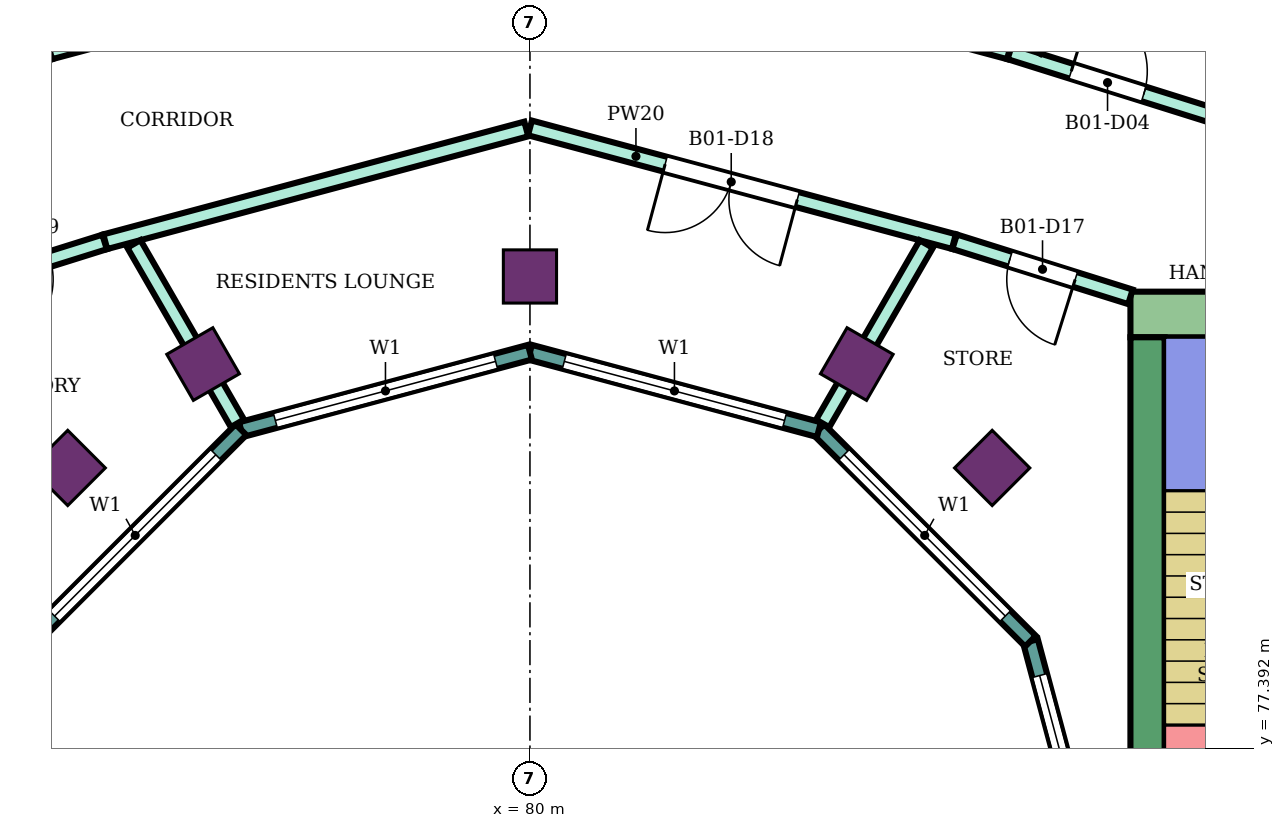
"""IFC4 building model, lengths in metres.
Left out: names, types, materials, properties, quantities, classifications, styles, units other than length and angle.
Written with IfcOpenShell. Run it as: python <this file> out.ifc"""

import sys

from ifc_helpers import new_model, si_unit, direction, frame, frame_2d, origin, origin_2d, place, context, subcontext, project, spatial, rectangle, extrude, element, fill, save


model = new_model("IFC4")
c1 = context("Model", 3, precision=1e-05, world=origin(), true_north=direction((0.0, 1.0)))
c2 = subcontext(c1, "Body", "Model", "MODEL_VIEW")
j1 = project(units=[si_unit("LENGTHUNIT", "METRE"), si_unit("PLANEANGLEUNIT", "RADIAN")], contexts=[c1])
p1 = place(None, origin())
s1 = spatial("IfcSite", under=j1, at=p1, CompositionType="ELEMENT")
p2 = place(p1, origin())
s2 = spatial("IfcBuilding", under=s1, at=p2, CompositionType="ELEMENT")
p3 = place(p2, frame((0.0, 0.0, 216.7)))
s3 = spatial("IfcBuildingStorey", under=s2, at=p3, CompositionType="ELEMENT", Elevation=216.7)
for number, where, z_axis, x_axis in (
    (1, (86.081, 81.081, 0.0), (0.0, 0.0, 1.0), (0.707, 0.707, 0.0)),
    (2, (84.3, 82.448, 0.0), (0.0, 0.0, 1.0), (0.5, 0.866, 0.0)),
    (3, (80.0, 83.6, 0.0), (0.0, 0.0, 1.0), (0.0, 1.0, 0.0)),
    (4, (75.7, 82.448, 0.0), (0.0, 0.0, 1.0), (-0.5, 0.866, 0.0)),
    (5, (73.919, 81.081, 0.0), (0.0, 0.0, 1.0), (-0.707, 0.707, 0.0)),
):
    element("IfcColumn", number, at=place(p3, frame(where, z_axis=z_axis, x_axis=x_axis)), inside=s3, PredefinedType="COLUMN", context=c2, shape_type="SweptSolid", body=[
        extrude(rectangle(XDim=0.7, YDim=0.7, at=origin_2d()), origin(), (0.0, 0.0, 1.0), 4.2),
    ])
p4 = place(p3, frame((87.9, 83.1, 0.0), z_axis=(0.0, 0.0, 1.0), x_axis=(1.0, 0.0, 0.0)))
e6 = element("IfcWall", 6, at=p4, inside=s3, PredefinedType="SHEAR", context=c2, shape_type="SweptSolid", body=[
    extrude(rectangle(XDim=14.9, YDim=0.6, at=frame_2d((7.45, 0.0))), origin(), (0.0, 0.0, 1.0), 3.88),
])
p5 = place(p4, frame((4.2, 0.0, 0.0)))
e7 = element("IfcOpeningElement", 7, at=p5, cuts=e6, PredefinedType="OPENING", context=c2, shape_type="SweptSolid", body=[
    extrude(rectangle(XDim=2.4, YDim=2.4, at=frame_2d((1.2, 1.2))), frame((0.0, 0.31, 0.0), z_axis=(0.0, -1.0, 0.0), x_axis=(1.0, 0.0, 0.0)), (0.0, 0.0, 1.0), 0.62),
])
p6 = place(p3, frame((88.125, 75.0, 0.0), z_axis=(0.0, 0.0, 1.0), x_axis=(0.0, 1.0, 0.0)))
e8 = element("IfcWall", 8, at=p6, inside=s3, PredefinedType="SHEAR", context=c2, shape_type="SweptSolid", body=[
    extrude(rectangle(XDim=7.8, YDim=0.45, at=frame_2d((3.9, 0.0))), origin(), (0.0, 0.0, 1.0), 3.88),
])
p7 = place(p3, frame((87.604, 75.0, 0.0), z_axis=(0.0, 0.0, 1.0), x_axis=(-0.258789828301, 0.965933654434, 0.0)))
e9 = element("IfcWall", 9, at=p7, inside=s3, PredefinedType="NOTDEFINED", context=c2, shape_type="SweptSolid", body=[
    extrude(rectangle(XDim=3.936, YDim=0.2, at=frame_2d((1.968, 0.0))), origin(), (0.0, 0.0, 1.0), 4.2),
])
p8 = place(p7, frame((0.468, 0.0, 0.9)))
e10 = element("IfcOpeningElement", 10, at=p8, cuts=e9, PredefinedType="OPENING", context=c2, shape_type="SweptSolid", body=[
    extrude(rectangle(XDim=3.0, YDim=2.3, at=frame_2d((1.5, 1.15))), frame((0.0, 0.11, 0.0), z_axis=(0.0, -1.0, 0.0), x_axis=(1.0, 0.0, 0.0)), (0.0, 0.0, 1.0), 0.22),
])
p9 = place(p3, frame((86.585, 78.802, 0.0), z_axis=(0.0, 0.0, 1.0), x_axis=(-0.707106781187, 0.707106781187, 0.0)))
e11 = element("IfcWall", 11, at=p9, inside=s3, PredefinedType="NOTDEFINED", context=c2, shape_type="SweptSolid", body=[
    extrude(rectangle(XDim=3.936, YDim=0.2, at=frame_2d((1.968, 0.0))), origin(), (0.0, 0.0, 1.0), 4.2),
])
p10 = place(p9, frame((0.468, 0.0, 0.9)))
e12 = element("IfcOpeningElement", 12, at=p10, cuts=e11, PredefinedType="OPENING", context=c2, shape_type="SweptSolid", body=[
    extrude(rectangle(XDim=3.0, YDim=2.3, at=frame_2d((1.5, 1.15))), frame((0.0, 0.11, 0.0), z_axis=(0.0, -1.0, 0.0), x_axis=(1.0, 0.0, 0.0)), (0.0, 0.0, 1.0), 0.22),
])
p11 = place(p3, frame((83.802, 81.585, 0.0), z_axis=(0.0, 0.0, 1.0), x_axis=(-0.965933654434, 0.258789828301, 0.0)))
e13 = element("IfcWall", 13, at=p11, inside=s3, PredefinedType="NOTDEFINED", context=c2, shape_type="SweptSolid", body=[
    extrude(rectangle(XDim=3.936, YDim=0.2, at=frame_2d((1.968, 0.0))), origin(), (0.0, 0.0, 1.0), 4.2),
])
p12 = place(p11, frame((0.468, 0.0, 0.9)))
e14 = element("IfcOpeningElement", 14, at=p12, cuts=e13, PredefinedType="OPENING", context=c2, shape_type="SweptSolid", body=[
    extrude(rectangle(XDim=3.0, YDim=2.3, at=frame_2d((1.5, 1.15))), frame((0.0, 0.11, 0.0), z_axis=(0.0, -1.0, 0.0), x_axis=(1.0, 0.0, 0.0)), (0.0, 0.0, 1.0), 0.22),
])
p13 = place(p3, frame((80.0, 82.604, 0.0), z_axis=(0.0, 0.0, 1.0), x_axis=(-0.965933654434, -0.258789828301, 0.0)))
e15 = element("IfcWall", 15, at=p13, inside=s3, PredefinedType="NOTDEFINED", context=c2, shape_type="SweptSolid", body=[
    extrude(rectangle(XDim=3.936, YDim=0.2, at=frame_2d((1.968, 0.0))), origin(), (0.0, 0.0, 1.0), 4.2),
])
p14 = place(p13, frame((0.468, 0.0, 0.9)))
e16 = element("IfcOpeningElement", 16, at=p14, cuts=e15, PredefinedType="OPENING", context=c2, shape_type="SweptSolid", body=[
    extrude(rectangle(XDim=3.0, YDim=2.3, at=frame_2d((1.5, 1.15))), frame((0.0, 0.11, 0.0), z_axis=(0.0, -1.0, 0.0), x_axis=(1.0, 0.0, 0.0)), (0.0, 0.0, 1.0), 0.22),
])
p15 = place(p3, frame((76.198, 81.585, 0.0), z_axis=(0.0, 0.0, 1.0), x_axis=(-0.707106781187, -0.707106781187, 0.0)))
e17 = element("IfcWall", 17, at=p15, inside=s3, PredefinedType="NOTDEFINED", context=c2, shape_type="SweptSolid", body=[
    extrude(rectangle(XDim=3.936, YDim=0.2, at=frame_2d((1.968, 0.0))), origin(), (0.0, 0.0, 1.0), 4.2),
])
p16 = place(p15, frame((0.468, 0.0, 0.9)))
e18 = element("IfcOpeningElement", 18, at=p16, cuts=e17, PredefinedType="OPENING", context=c2, shape_type="SweptSolid", body=[
    extrude(rectangle(XDim=3.0, YDim=2.3, at=frame_2d((1.5, 1.15))), frame((0.0, 0.11, 0.0), z_axis=(0.0, -1.0, 0.0), x_axis=(1.0, 0.0, 0.0)), (0.0, 0.0, 1.0), 0.22),
])
p17 = place(p3, frame((72.1, 83.332, 0.0), z_axis=(0.0, 0.0, 1.0), x_axis=(0.954233106619, 0.299063836383, 0.0)))
e19 = element("IfcWall", 19, at=p17, inside=s3, PredefinedType="PARTITIONING", context=c2, shape_type="SweptSolid", body=[
    extrude(rectangle(XDim=2.414, YDim=0.2, at=frame_2d((1.207, 0.0))), origin(), (0.0, 0.0, 1.0), 3.75),
])
p18 = place(p17, frame((0.762, 0.0, 0.0)))
e20 = element("IfcOpeningElement", 20, at=p18, cuts=e19, PredefinedType="OPENING", context=c2, shape_type="SweptSolid", body=[
    extrude(rectangle(XDim=0.9, YDim=2.1, at=frame_2d((0.45, 1.05))), frame((0.0, 0.11, 0.0), z_axis=(0.0, -1.0, 0.0), x_axis=(1.0, 0.0, 0.0)), (0.0, 0.0, 1.0), 0.22),
])
p19 = place(p3, frame((73.687, 86.555, 0.0), z_axis=(0.0, 0.0, 1.0), x_axis=(0.966020868517, 0.258464081818, 0.0)))
e21 = element("IfcWall", 21, at=p19, inside=s3, PredefinedType="PARTITIONING", context=c2, shape_type="SweptSolid", body=[
    extrude(rectangle(XDim=6.446, YDim=0.2, at=frame_2d((3.223, 0.0))), origin(), (0.0, 0.0, 1.0), 3.75),
])
p20 = place(p19, frame((5.362, 0.0, 0.0)))
e22 = element("IfcOpeningElement", 22, at=p20, cuts=e21, PredefinedType="OPENING", context=c2, shape_type="SweptSolid", body=[
    extrude(rectangle(XDim=1.0, YDim=2.1, at=frame_2d((0.5, 1.05))), frame((0.0, 0.11, 0.0), z_axis=(0.0, -1.0, 0.0), x_axis=(1.0, 0.0, 0.0)), (0.0, 0.0, 1.0), 0.22),
])
p21 = place(p3, frame((74.413, 84.057, 0.0), z_axis=(0.0, 0.0, 1.0), x_axis=(0.965970849692, 0.258650956976, 0.0)))
e23 = element("IfcWall", 23, at=p21, inside=s3, PredefinedType="PARTITIONING", context=c2, shape_type="SweptSolid", body=[
    extrude(rectangle(XDim=5.734, YDim=0.2, at=frame_2d((2.867, 0.0))), origin(), (0.0, 0.0, 1.0), 3.75),
])
p22 = place(p3, frame((74.79, 84.028, 0.0), z_axis=(0.0, 0.0, 1.0), x_axis=(0.499820708267, -0.866128893172, 0.0)))
e24 = element("IfcWall", 24, at=p22, inside=s3, PredefinedType="PARTITIONING", context=c2, shape_type="SweptSolid", body=[
    extrude(rectangle(XDim=2.725, YDim=0.2, at=frame_2d((1.362, 0.0))), origin(), (0.0, 0.0, 1.0), 3.75),
])
p23 = place(p3, frame((80.0, 85.554, 0.0), z_axis=(0.0, 0.0, 1.0), x_axis=(0.965894438951, -0.258936155845, 0.0)))
e25 = element("IfcWall", 25, at=p23, inside=s3, PredefinedType="PARTITIONING", context=c2, shape_type="SweptSolid", body=[
    extrude(rectangle(XDim=5.774, YDim=0.2, at=frame_2d((2.887, 0.0))), origin(), (0.0, 0.0, 1.0), 3.75),
])
p24 = place(p23, frame((1.841, 0.0, 0.0)))
e26 = element("IfcOpeningElement", 26, at=p24, cuts=e25, PredefinedType="OPENING", context=c2, shape_type="SweptSolid", body=[
    extrude(rectangle(XDim=1.8, YDim=2.1, at=frame_2d((0.9, 1.05))), frame((0.0, 0.11, 0.0), z_axis=(0.0, -1.0, 0.0), x_axis=(1.0, 0.0, 0.0)), (0.0, 0.0, 1.0), 0.22),
])
p25 = place(p3, frame((80.0, 88.246, 0.0), z_axis=(0.0, 0.0, 1.0), x_axis=(0.965866355913, -0.25904088966, 0.0)))
e27 = element("IfcWall", 27, at=p25, inside=s3, PredefinedType="PARTITIONING", context=c2, shape_type="SweptSolid", body=[
    extrude(rectangle(XDim=6.526, YDim=0.2, at=frame_2d((3.263, 0.0))), origin(), (0.0, 0.0, 1.0), 3.75),
])
p26 = place(p3, frame((83.852, 81.667, 0.0), z_axis=(0.0, 0.0, 1.0), x_axis=(0.500138740334, 0.865945287196, 0.0)))
e28 = element("IfcWall", 28, at=p26, inside=s3, PredefinedType="PARTITIONING", context=c2, shape_type="SweptSolid", body=[
    extrude(rectangle(XDim=2.724, YDim=0.2, at=frame_2d((1.362, 0.0))), origin(), (0.0, 0.0, 1.0), 3.75),
])
p27 = place(p3, frame((85.587, 84.057, 0.0), z_axis=(0.0, 0.0, 1.0), x_axis=(0.954239513179, -0.299043393987, 0.0)))
e29 = element("IfcWall", 29, at=p27, inside=s3, PredefinedType="PARTITIONING", context=c2, shape_type="SweptSolid", body=[
    extrude(rectangle(XDim=2.424, YDim=0.2, at=frame_2d((1.212, 0.0))), origin(), (0.0, 0.0, 1.0), 3.75),
])
p28 = place(p27, frame((0.762, 0.0, 0.0)))
e30 = element("IfcOpeningElement", 30, at=p28, cuts=e29, PredefinedType="OPENING", context=c2, shape_type="SweptSolid", body=[
    extrude(rectangle(XDim=0.9, YDim=2.1, at=frame_2d((0.45, 1.05))), frame((0.0, 0.11, 0.0), z_axis=(0.0, -1.0, 0.0), x_axis=(1.0, 0.0, 0.0)), (0.0, 0.0, 1.0), 0.22),
])
p29 = place(p3, frame((86.313, 86.554, 0.0), z_axis=(0.0, 0.0, 1.0), x_axis=(0.954081217458, -0.299548043717, 0.0)))
e31 = element("IfcWall", 31, at=p29, inside=s3, PredefinedType="PARTITIONING", context=c2, shape_type="SweptSolid", body=[
    extrude(rectangle(XDim=5.721, YDim=0.2, at=frame_2d((2.86, 0.0))), origin(), (0.0, 0.0, 1.0), 3.75),
])
p30 = place(p29, frame((0.848, 0.0, 0.0)))
e32 = element("IfcOpeningElement", 32, at=p30, cuts=e31, PredefinedType="OPENING", context=c2, shape_type="SweptSolid", body=[
    extrude(rectangle(XDim=1.0, YDim=2.1, at=frame_2d((0.5, 1.05))), frame((0.0, 0.11, 0.0), z_axis=(0.0, -1.0, 0.0), x_axis=(1.0, 0.0, 0.0)), (0.0, 0.0, 1.0), 0.22),
])
p31 = place(p3, frame((86.671, 86.554, 0.0), z_axis=(0.0, 0.0, 1.0), x_axis=(0.50001992892, 0.866013897511, 0.0)))
e33 = element("IfcWall", 33, at=p31, inside=s3, PredefinedType="PARTITIONING", context=c2, shape_type="SweptSolid", body=[
    extrude(rectangle(XDim=12.456, YDim=0.1, at=frame_2d((6.228, 0.0))), origin(), (0.0, 0.0, 1.0), 3.75),
])
p32 = place(p31, frame((9.215, 0.0, 0.0)))
e34 = element("IfcOpeningElement", 34, at=p32, cuts=e33, PredefinedType="OPENING", context=c2, shape_type="SweptSolid", body=[
    extrude(rectangle(XDim=0.9, YDim=2.1, at=frame_2d((0.45, 1.05))), frame((0.0, 0.06, 0.0), z_axis=(0.0, -1.0, 0.0), x_axis=(1.0, 0.0, 0.0)), (0.0, 0.0, 1.0), 0.12),
])
p33 = place(p31, frame((2.974, 0.0, 0.0)))
e35 = element("IfcOpeningElement", 35, at=p33, cuts=e33, PredefinedType="OPENING", context=c2, shape_type="SweptSolid", body=[
    extrude(rectangle(XDim=0.8, YDim=2.1, at=frame_2d((0.4, 1.05))), frame((0.0, 0.06, 0.0), z_axis=(0.0, -1.0, 0.0), x_axis=(1.0, 0.0, 0.0)), (0.0, 0.0, 1.0), 0.12),
])
p34 = place(p8, origin())
e36 = element("IfcWindow", 36, at=p34, inside=s3, PartitioningType="SINGLE_PANEL", PredefinedType="WINDOW", context=c2, shape_type="SweptSolid", body=[
    extrude(rectangle(XDim=3.0, YDim=2.3, at=frame_2d((1.5, 1.15))), frame((0.0, 0.03, 0.0), z_axis=(0.0, -1.0, 0.0), x_axis=(1.0, 0.0, 0.0)), (0.0, 0.0, 1.0), 0.06),
])
fill(e10, e36)
p35 = place(p10, origin())
e37 = element("IfcWindow", 37, at=p35, inside=s3, PartitioningType="SINGLE_PANEL", PredefinedType="WINDOW", context=c2, shape_type="SweptSolid", body=[
    extrude(rectangle(XDim=3.0, YDim=2.3, at=frame_2d((1.5, 1.15))), frame((0.0, 0.03, 0.0), z_axis=(0.0, -1.0, 0.0), x_axis=(1.0, 0.0, 0.0)), (0.0, 0.0, 1.0), 0.06),
])
fill(e12, e37)
p36 = place(p12, origin())
e38 = element("IfcWindow", 38, at=p36, inside=s3, PartitioningType="SINGLE_PANEL", PredefinedType="WINDOW", context=c2, shape_type="SweptSolid", body=[
    extrude(rectangle(XDim=3.0, YDim=2.3, at=frame_2d((1.5, 1.15))), frame((0.0, 0.03, 0.0), z_axis=(0.0, -1.0, 0.0), x_axis=(1.0, 0.0, 0.0)), (0.0, 0.0, 1.0), 0.06),
])
fill(e14, e38)
p37 = place(p14, origin())
e39 = element("IfcWindow", 39, at=p37, inside=s3, PartitioningType="SINGLE_PANEL", PredefinedType="WINDOW", context=c2, shape_type="SweptSolid", body=[
    extrude(rectangle(XDim=3.0, YDim=2.3, at=frame_2d((1.5, 1.15))), frame((0.0, 0.03, 0.0), z_axis=(0.0, -1.0, 0.0), x_axis=(1.0, 0.0, 0.0)), (0.0, 0.0, 1.0), 0.06),
])
fill(e16, e39)
p38 = place(p16, origin())
e40 = element("IfcWindow", 40, at=p38, inside=s3, PartitioningType="SINGLE_PANEL", PredefinedType="WINDOW", context=c2, shape_type="SweptSolid", body=[
    extrude(rectangle(XDim=3.0, YDim=2.3, at=frame_2d((1.5, 1.15))), frame((0.0, 0.03, 0.0), z_axis=(0.0, -1.0, 0.0), x_axis=(1.0, 0.0, 0.0)), (0.0, 0.0, 1.0), 0.06),
])
fill(e18, e40)
p39 = place(p30, origin())
e41 = element("IfcDoor", 41, at=p39, inside=s3, OperationType="SINGLE_SWING_LEFT", PredefinedType="DOOR", context=c2, shape_type="SweptSolid", body=[
    extrude(rectangle(XDim=1.0, YDim=2.1, at=frame_2d((0.5, 1.05))), frame((0.0, 0.025, 0.0), z_axis=(0.0, -1.0, 0.0), x_axis=(1.0, 0.0, 0.0)), (0.0, 0.0, 1.0), 0.05),
])
fill(e32, e41)
p40 = place(p28, frame((0.9, 0.0, 0.0), z_axis=(0.0, 0.0, 1.0), x_axis=(-1.0, 0.0, 0.0)))
e42 = element("IfcDoor", 42, at=p40, inside=s3, OperationType="SINGLE_SWING_LEFT", PredefinedType="DOOR", context=c2, shape_type="SweptSolid", body=[
    extrude(rectangle(XDim=0.9, YDim=2.1, at=frame_2d((0.45, 1.05))), frame((0.0, 0.025, 0.0), z_axis=(0.0, -1.0, 0.0), x_axis=(1.0, 0.0, 0.0)), (0.0, 0.0, 1.0), 0.05),
])
fill(e30, e42)
p41 = place(p24, frame((1.8, 0.0, 0.0), z_axis=(0.0, 0.0, 1.0), x_axis=(-1.0, 0.0, 0.0)))
e43 = element("IfcDoor", 43, at=p41, inside=s3, OperationType="DOUBLE_DOOR_SINGLE_SWING", PredefinedType="DOOR", context=c2, shape_type="SweptSolid", body=[
    extrude(rectangle(XDim=1.8, YDim=2.1, at=frame_2d((0.9, 1.05))), frame((0.0, 0.025, 0.0), z_axis=(0.0, -1.0, 0.0), x_axis=(1.0, 0.0, 0.0)), (0.0, 0.0, 1.0), 0.05),
])
fill(e26, e43)
save(model, sys.argv[1])
